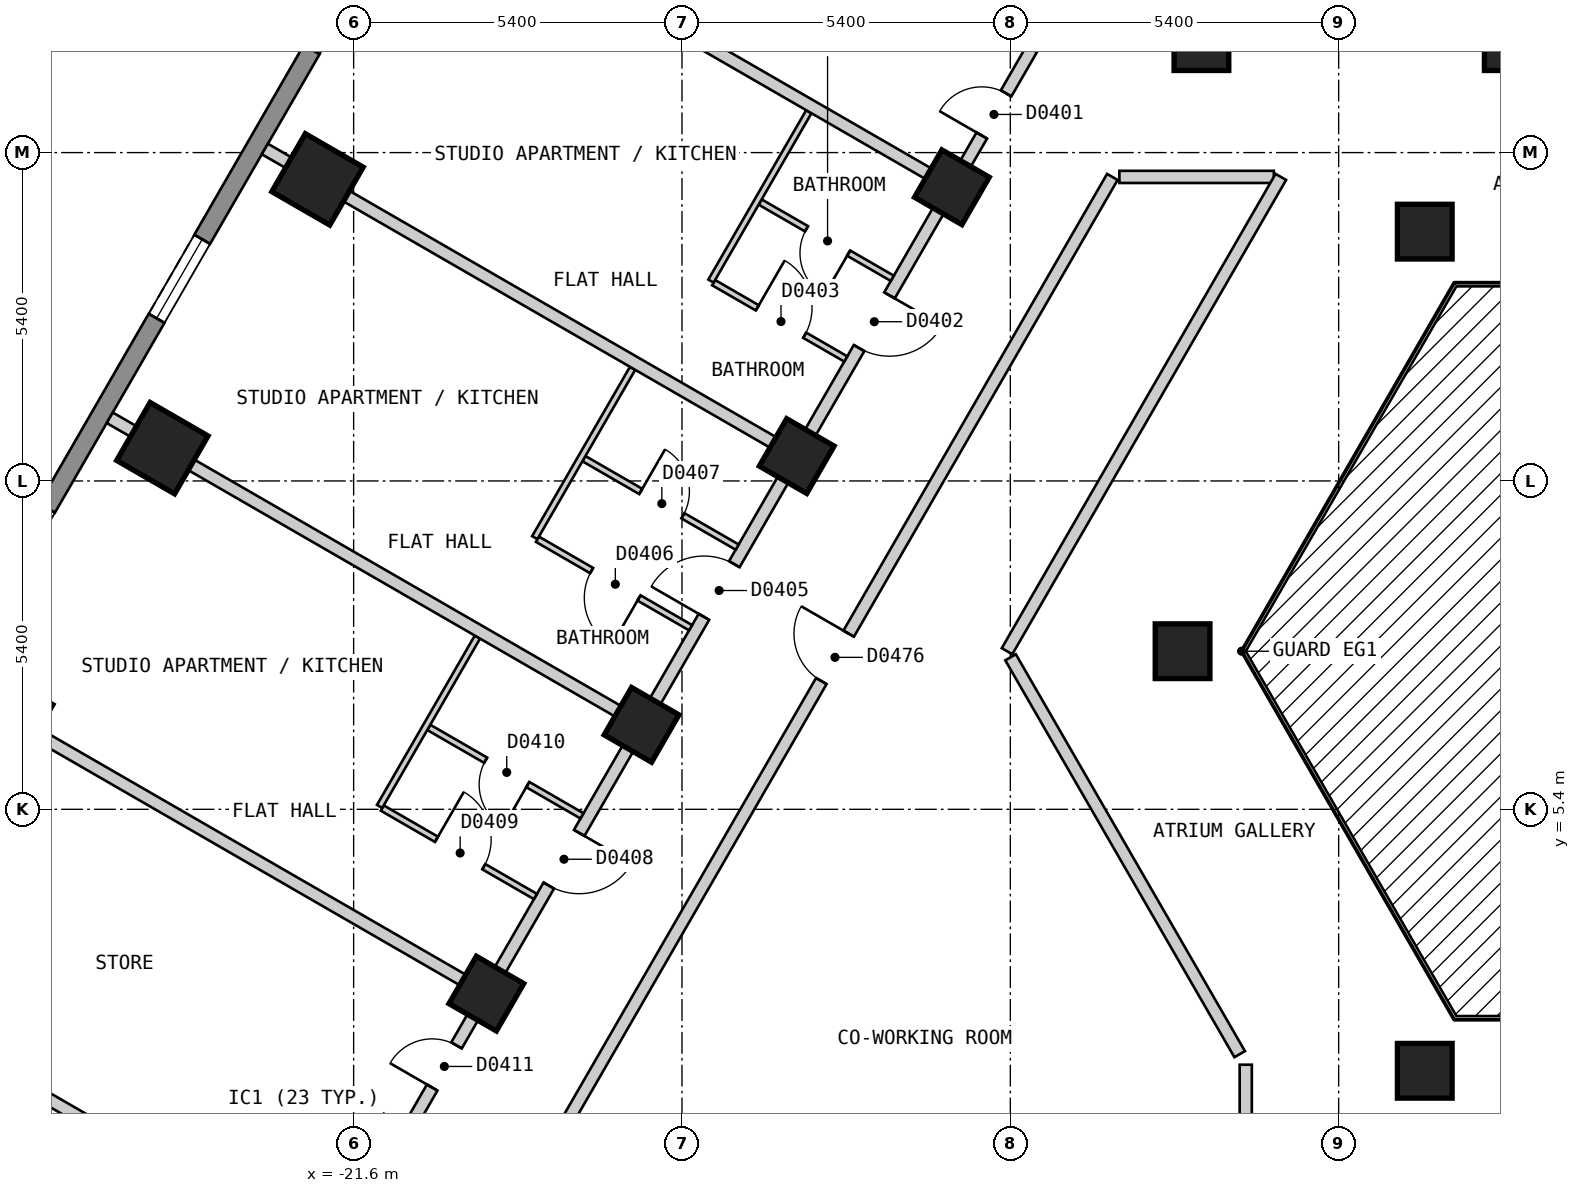
"""IFC4 building model, lengths in metres.
Left out: names, types, materials, properties, quantities, classifications, styles, units other than length and angle.
Written with IfcOpenShell. Run it as: python <this file> out.ifc"""

import sys

from ifc_helpers import new_model, si_unit, direction, frame, frame_2d, origin, origin_2d, place, context, subcontext, project, spatial, polyline, rectangle, outline, extrude, element, fill, save


model = new_model("IFC4")
c1 = context("Model", 3, precision=1e-05, world=origin(), true_north=direction((0.0, 1.0)))
c2 = subcontext(c1, "Body", "Model", "MODEL_VIEW")
j1 = project(units=[si_unit("LENGTHUNIT", "METRE"), si_unit("PLANEANGLEUNIT", "RADIAN")], contexts=[c1])
p1 = place(None, origin())
s1 = spatial("IfcSite", under=j1, at=p1, CompositionType="ELEMENT")
p2 = place(p1, origin())
s2 = spatial("IfcBuilding", under=s1, at=p2, CompositionType="ELEMENT")
p3 = place(p2, frame((0.0, 0.0, 26.4)))
s3 = spatial("IfcBuildingStorey", under=s2, at=p3, CompositionType="ELEMENT", Elevation=26.4)
for number, where, z_axis, x_axis in (
    (1, (-22.194, 15.759, 0.0), (0.0, 0.0, 1.0), (-0.5, -0.866, 0.0)),
    (2, (-24.746, 11.339, 0.0), (0.0, 0.0, 1.0), (-0.5, -0.866, 0.0)),
    (3, (-27.298, 6.919, 0.0), (0.0, 0.0, 1.0), (-0.5, -0.866, 0.0)),
):
    element("IfcColumn", number, at=place(p3, frame(where, z_axis=z_axis, x_axis=x_axis)), inside=s3, PredefinedType="COLUMN", context=c2, shape_type="SweptSolid", body=[
        extrude(rectangle(XDim=1.1, YDim=1.1, at=origin_2d()), origin(), (0.0, 0.0, 1.0), 3.0),
    ])
for number, where, z_axis, x_axis in (
    (4, (-2.553, 18.0, 0.0), (0.0, 0.0, 1.0), (-1.0, 0.0, 0.0)),
    (5, (-3.984, 14.9, 0.0), (0.0, 0.0, 1.0), (1.0, 0.0, 0.0)),
    (6, (-7.657, 18.0, 0.0), (0.0, 0.0, 1.0), (-1.0, 0.0, 0.0)),
    (7, (-11.761, 15.63, 0.0), (0.0, 0.0, 1.0), (-0.5, -0.866, 0.0)),
    (8, (-7.967, 8.0, 0.0), (0.0, 0.0, 1.0), (1.0, 0.0, 0.0)),
    (9, (-14.313, 11.209, 0.0), (0.0, 0.0, 1.0), (-0.5, -0.866, 0.0)),
    (10, (-16.865, 6.789, 0.0), (0.0, 0.0, 1.0), (-0.5, -0.866, 0.0)),
    (11, (-3.984, 1.1, 0.0), (0.0, 0.0, 1.0), (1.0, 0.0, 0.0)),
    (12, (-19.417, 2.369, 0.0), (0.0, 0.0, 1.0), (-0.5, -0.866, 0.0)),
):
    element("IfcColumn", number, at=place(p3, frame(where, z_axis=z_axis, x_axis=x_axis)), inside=s3, PredefinedType="COLUMN", context=c2, shape_type="SweptSolid", body=[
        extrude(rectangle(XDim=0.9, YDim=0.9, at=origin_2d()), origin(), (0.0, 0.0, 1.0), 3.0),
    ])
p4 = place(p3, frame((-17.71, 25.825, 0.0), z_axis=(0.0, 0.0, 1.0), x_axis=(-0.500001938803, -0.866024284413, 0.0)))
e13 = element("IfcWall", 13, at=p4, inside=s3, PredefinedType="SOLIDWALL", context=c2, shape_type="SweptSolid", body=[
    extrude(outline(polyline([(0.0, -0.15), (27.02, -0.15), (26.94, 0.15), (0.08, 0.15), (0.0, -0.15)])), origin(), (0.0, 0.0, 1.0), 2.7),
])
p5 = place(p4, frame((2.553, 0.0, 0.15)))
e14 = element("IfcOpeningElement", 14, at=p5, cuts=e13, PredefinedType="OPENING", context=c2, shape_type="SweptSolid", body=[
    extrude(rectangle(XDim=1.5, YDim=2.1, at=frame_2d((0.75, 1.05))), frame((0.0, 0.16, 0.0), z_axis=(0.0, -1.0, 0.0), x_axis=(1.0, 0.0, 0.0)), (0.0, 0.0, 1.0), 0.32),
])
p6 = place(p4, frame((7.658, 0.0, 0.15)))
e15 = element("IfcOpeningElement", 15, at=p6, cuts=e13, PredefinedType="OPENING", context=c2, shape_type="SweptSolid", body=[
    extrude(rectangle(XDim=1.5, YDim=2.1, at=frame_2d((0.75, 1.05))), frame((0.0, 0.16, 0.0), z_axis=(0.0, -1.0, 0.0), x_axis=(1.0, 0.0, 0.0)), (0.0, 0.0, 1.0), 0.32),
])
p7 = place(p4, frame((12.761, 0.0, 0.15)))
e16 = element("IfcOpeningElement", 16, at=p7, cuts=e13, PredefinedType="OPENING", context=c2, shape_type="SweptSolid", body=[
    extrude(rectangle(XDim=1.5, YDim=2.1, at=frame_2d((0.75, 1.05))), frame((0.0, 0.16, 0.0), z_axis=(0.0, -1.0, 0.0), x_axis=(1.0, 0.0, 0.0)), (0.0, 0.0, 1.0), 0.32),
])
p8 = place(p4, frame((17.865, 0.0, 0.15)))
e17 = element("IfcOpeningElement", 17, at=p8, cuts=e13, PredefinedType="OPENING", context=c2, shape_type="SweptSolid", body=[
    extrude(rectangle(XDim=1.5, YDim=2.1, at=frame_2d((0.75, 1.05))), frame((0.0, 0.16, 0.0), z_axis=(0.0, -1.0, 0.0), x_axis=(1.0, 0.0, 0.0)), (0.0, 0.0, 1.0), 0.32),
])
p9 = place(p4, frame((22.969, 0.0, 0.15)))
e18 = element("IfcOpeningElement", 18, at=p9, cuts=e13, PredefinedType="OPENING", context=c2, shape_type="SweptSolid", body=[
    extrude(rectangle(XDim=1.5, YDim=2.1, at=frame_2d((0.75, 1.05))), frame((0.0, 0.16, 0.0), z_axis=(0.0, -1.0, 0.0), x_axis=(1.0, 0.0, 0.0)), (0.0, 0.0, 1.0), 0.32),
])
p10 = place(p3, frame((-10.796, 7.9, 0.0), z_axis=(0.0, 0.0, 1.0), x_axis=(0.499954271211, -0.866051803703, 0.0)))
e19 = element("IfcWall", 19, at=p10, inside=s3, PredefinedType="PARTITIONING", context=c2, shape_type="SweptSolid", body=[
    extrude(rectangle(XDim=7.536, YDim=0.2, at=frame_2d((3.768, 0.0))), origin(), (0.0, 0.0, 1.0), 2.7),
])
p11 = place(p3, frame((-9.006, 15.8, 0.0), z_axis=(0.0, 0.0, 1.0), x_axis=(1.0, 0.0, 0.0)))
e20 = element("IfcWall", 20, at=p11, inside=s3, PredefinedType="PARTITIONING", context=c2, shape_type="SweptSolid", body=[
    extrude(rectangle(XDim=2.54, YDim=0.2, at=frame_2d((1.27, 0.0))), origin(), (0.0, 0.0, 1.0), 2.7),
])
p12 = place(p3, frame((-10.854, 8.0, 0.0), z_axis=(0.0, 0.0, 1.0), x_axis=(0.499964141897, 0.86604610548, 0.0)))
e21 = element("IfcWall", 21, at=p12, inside=s3, PredefinedType="PARTITIONING", context=c2, shape_type="SweptSolid", body=[
    extrude(rectangle(XDim=9.007, YDim=0.2, at=frame_2d((4.503, 0.0))), origin(), (0.0, 0.0, 1.0), 2.7),
])
p13 = place(p3, frame((-18.244, -0.001, 0.0), z_axis=(0.0, 0.0, 1.0), x_axis=(0.499962999376, 0.866046765051, 0.0)))
e22 = element("IfcWall", 22, at=p13, inside=s3, PredefinedType="PARTITIONING", context=c2, shape_type="SweptSolid", body=[
    extrude(rectangle(XDim=18.245, YDim=0.2, at=frame_2d((9.123, 0.0))), origin(), (0.0, 0.0, 1.0), 2.7),
])
p14 = place(p13, frame((8.672, 0.0, 0.0)))
e23 = element("IfcOpeningElement", 23, at=p14, cuts=e22, PredefinedType="OPENING", context=c2, shape_type="SweptSolid", body=[
    extrude(rectangle(XDim=0.9, YDim=2.1, at=frame_2d((0.45, 1.05))), frame((0.0, 0.11, 0.0), z_axis=(0.0, -1.0, 0.0), x_axis=(1.0, 0.0, 0.0)), (0.0, 0.0, 1.0), 0.22),
])
p15 = place(p3, frame((-20.727, 0.099, 0.0), z_axis=(0.0, 0.0, 1.0), x_axis=(0.499993204491, 0.866029327138, 0.0)))
e24 = element("IfcWall", 24, at=p15, inside=s3, PredefinedType="PARTITIONING", context=c2, shape_type="SweptSolid", body=[
    extrude(rectangle(XDim=20.554, YDim=0.2, at=frame_2d((10.277, 0.0))), origin(), (0.0, 0.0, 1.0), 2.7),
])
p16 = place(p15, frame((18.916, 0.0, 0.0)))
e25 = element("IfcOpeningElement", 25, at=p16, cuts=e24, PredefinedType="OPENING", context=c2, shape_type="SweptSolid", body=[
    extrude(rectangle(XDim=0.8, YDim=2.1, at=frame_2d((0.4, 1.05))), frame((0.0, 0.11, 0.0), z_axis=(0.0, -1.0, 0.0), x_axis=(1.0, 0.0, 0.0)), (0.0, 0.0, 1.0), 0.22),
])
p17 = place(p15, frame((14.88, 0.0, 0.0)))
e26 = element("IfcOpeningElement", 26, at=p17, cuts=e24, PredefinedType="OPENING", context=c2, shape_type="SweptSolid", body=[
    extrude(rectangle(XDim=1.0, YDim=2.1, at=frame_2d((0.5, 1.05))), frame((0.0, 0.11, 0.0), z_axis=(0.0, -1.0, 0.0), x_axis=(1.0, 0.0, 0.0)), (0.0, 0.0, 1.0), 0.22),
])
p18 = place(p15, frame((9.776, 0.0, 0.0)))
e27 = element("IfcOpeningElement", 27, at=p18, cuts=e24, PredefinedType="OPENING", context=c2, shape_type="SweptSolid", body=[
    extrude(rectangle(XDim=1.0, YDim=2.1, at=frame_2d((0.5, 1.05))), frame((0.0, 0.11, 0.0), z_axis=(0.0, -1.0, 0.0), x_axis=(1.0, 0.0, 0.0)), (0.0, 0.0, 1.0), 0.22),
])
p19 = place(p15, frame((4.673, 0.0, 0.0)))
e28 = element("IfcOpeningElement", 28, at=p19, cuts=e24, PredefinedType="OPENING", context=c2, shape_type="SweptSolid", body=[
    extrude(rectangle(XDim=1.0, YDim=2.1, at=frame_2d((0.5, 1.05))), frame((0.0, 0.11, 0.0), z_axis=(0.0, -1.0, 0.0), x_axis=(1.0, 0.0, 0.0)), (0.0, 0.0, 1.0), 0.22),
])
p20 = place(p15, frame((0.838, 0.0, 0.0)))
e29 = element("IfcOpeningElement", 29, at=p20, cuts=e24, PredefinedType="OPENING", context=c2, shape_type="SweptSolid", body=[
    extrude(rectangle(XDim=0.8, YDim=2.1, at=frame_2d((0.4, 1.05))), frame((0.0, 0.11, 0.0), z_axis=(0.0, -1.0, 0.0), x_axis=(1.0, 0.0, 0.0)), (0.0, 0.0, 1.0), 0.22),
])
p21 = place(p3, frame((-6.928, -2.8, 0.0), z_axis=(0.0, 0.0, 1.0), x_axis=(0.0, 1.0, 0.0)))
e30 = element("IfcWall", 30, at=p21, inside=s3, PredefinedType="PARTITIONING", context=c2, shape_type="SweptSolid", body=[
    extrude(rectangle(XDim=4.0, YDim=0.2, at=frame_2d((2.0, 0.0))), origin(), (0.0, 0.0, 1.0), 2.7),
])
p22 = place(p3, frame((-20.364, 6.747, 0.0), z_axis=(0.0, 0.0, 1.0), x_axis=(0.866003949776, -0.500037157592, 0.0)))
e31 = element("IfcWall", 31, at=p22, inside=s3, PredefinedType="PARTITIONING", context=c2, shape_type="SweptSolid", body=[
    extrude(rectangle(XDim=2.91, YDim=0.1, at=frame_2d((1.455, 0.0))), origin(), (0.0, 0.0, 1.0), 2.7),
])
p23 = place(p22, frame((1.08, 0.0, 0.0)))
e32 = element("IfcOpeningElement", 32, at=p23, cuts=e31, PredefinedType="OPENING", context=c2, shape_type="SweptSolid", body=[
    extrude(rectangle(XDim=0.8, YDim=2.1, at=frame_2d((0.4, 1.05))), frame((0.0, 0.06, 0.0), z_axis=(0.0, -1.0, 0.0), x_axis=(1.0, 0.0, 0.0)), (0.0, 0.0, 1.0), 0.12),
])
p24 = place(p3, frame((-21.129, 5.421, 0.0), z_axis=(0.0, 0.0, 1.0), x_axis=(0.865935355752, -0.500155935342, 0.0)))
e33 = element("IfcWall", 33, at=p24, inside=s3, PredefinedType="PARTITIONING", context=c2, shape_type="SweptSolid", body=[
    extrude(rectangle(XDim=2.909, YDim=0.1, at=frame_2d((1.454, 0.0))), origin(), (0.0, 0.0, 1.0), 2.7),
])
p25 = place(p24, frame((1.029, 0.0, 0.0)))
e34 = element("IfcOpeningElement", 34, at=p25, cuts=e33, PredefinedType="OPENING", context=c2, shape_type="SweptSolid", body=[
    extrude(rectangle(XDim=0.9, YDim=2.1, at=frame_2d((0.45, 1.05))), frame((0.0, 0.06, 0.0), z_axis=(0.0, -1.0, 0.0), x_axis=(1.0, 0.0, 0.0)), (0.0, 0.0, 1.0), 0.12),
])
p26 = place(p3, frame((-18.577, 9.841, 0.0), z_axis=(0.0, 0.0, 1.0), x_axis=(0.865899003441, -0.500218867937, 0.0)))
e35 = element("IfcWall", 35, at=p26, inside=s3, PredefinedType="PARTITIONING", context=c2, shape_type="SweptSolid", body=[
    extrude(rectangle(XDim=2.909, YDim=0.1, at=frame_2d((1.455, 0.0))), origin(), (0.0, 0.0, 1.0), 2.7),
])
p27 = place(p26, frame((1.029, 0.0, 0.0)))
e36 = element("IfcOpeningElement", 36, at=p27, cuts=e35, PredefinedType="OPENING", context=c2, shape_type="SweptSolid", body=[
    extrude(rectangle(XDim=0.9, YDim=2.1, at=frame_2d((0.45, 1.05))), frame((0.0, 0.06, 0.0), z_axis=(0.0, -1.0, 0.0), x_axis=(1.0, 0.0, 0.0)), (0.0, 0.0, 1.0), 0.12),
])
p28 = place(p3, frame((-15.679, 14.061, 0.0), z_axis=(0.0, 0.0, 1.0), x_axis=(0.865916579361, -0.500188442078, 0.0)))
e37 = element("IfcWall", 37, at=p28, inside=s3, PredefinedType="PARTITIONING", context=c2, shape_type="SweptSolid", body=[
    extrude(rectangle(XDim=2.509, YDim=0.1, at=frame_2d((1.255, 0.0))), origin(), (0.0, 0.0, 1.0), 2.7),
])
p29 = place(p28, frame((0.829, 0.0, 0.0)))
e38 = element("IfcOpeningElement", 38, at=p29, cuts=e37, PredefinedType="OPENING", context=c2, shape_type="SweptSolid", body=[
    extrude(rectangle(XDim=0.9, YDim=2.1, at=frame_2d((0.45, 1.05))), frame((0.0, 0.06, 0.0), z_axis=(0.0, -1.0, 0.0), x_axis=(1.0, 0.0, 0.0)), (0.0, 0.0, 1.0), 0.12),
])
p30 = place(p3, frame((-14.914, 15.387, 0.0), z_axis=(0.0, 0.0, 1.0), x_axis=(0.865983051302, -0.500073349477, 0.0)))
e39 = element("IfcWall", 39, at=p30, inside=s3, PredefinedType="PARTITIONING", context=c2, shape_type="SweptSolid", body=[
    extrude(rectangle(XDim=2.509, YDim=0.1, at=frame_2d((1.255, 0.0))), origin(), (0.0, 0.0, 1.0), 2.7),
])
p31 = place(p30, frame((0.88, 0.0, 0.0)))
e40 = element("IfcOpeningElement", 40, at=p31, cuts=e39, PredefinedType="OPENING", context=c2, shape_type="SweptSolid", body=[
    extrude(rectangle(XDim=0.8, YDim=2.1, at=frame_2d((0.4, 1.05))), frame((0.0, 0.06, 0.0), z_axis=(0.0, -1.0, 0.0), x_axis=(1.0, 0.0, 0.0)), (0.0, 0.0, 1.0), 0.12),
])
p32 = place(p3, frame((-17.813, 11.167, 0.0), z_axis=(0.0, 0.0, 1.0), x_axis=(0.866087824531, -0.499891868507, 0.0)))
e41 = element("IfcWall", 41, at=p32, inside=s3, PredefinedType="PARTITIONING", context=c2, shape_type="SweptSolid", body=[
    extrude(rectangle(XDim=2.911, YDim=0.1, at=frame_2d((1.456, 0.0))), origin(), (0.0, 0.0, 1.0), 2.7),
])
p33 = place(p32, frame((1.08, 0.0, 0.0)))
e42 = element("IfcOpeningElement", 42, at=p33, cuts=e41, PredefinedType="OPENING", context=c2, shape_type="SweptSolid", body=[
    extrude(rectangle(XDim=0.8, YDim=2.1, at=frame_2d((0.4, 1.05))), frame((0.0, 0.06, 0.0), z_axis=(0.0, -1.0, 0.0), x_axis=(1.0, 0.0, 0.0)), (0.0, 0.0, 1.0), 0.12),
])
p34 = place(p3, frame((-15.723, 14.087, 0.0), z_axis=(0.0, 0.0, 1.0), x_axis=(0.500204249835, 0.865907447969, 0.0)))
e43 = element("IfcWall", 43, at=p34, inside=s3, PredefinedType="PARTITIONING", context=c2, shape_type="SweptSolid", body=[
    extrude(rectangle(XDim=3.217, YDim=0.1, at=frame_2d((1.608, 0.0))), origin(), (0.0, 0.0, 1.0), 2.7),
])
p35 = place(p3, frame((-21.173, 5.447, 0.0), z_axis=(0.0, 0.0, 1.0), x_axis=(0.500162542782, 0.865931539325, 0.0)))
e44 = element("IfcWall", 44, at=p35, inside=s3, PredefinedType="PARTITIONING", context=c2, shape_type="SweptSolid", body=[
    extrude(rectangle(XDim=3.217, YDim=0.1, at=frame_2d((1.609, 0.0))), origin(), (0.0, 0.0, 1.0), 2.7),
])
p36 = place(p3, frame((-18.621, 9.867, 0.0), z_axis=(0.0, 0.0, 1.0), x_axis=(0.500197891286, 0.865911121047, 0.0)))
e45 = element("IfcWall", 45, at=p36, inside=s3, PredefinedType="PARTITIONING", context=c2, shape_type="SweptSolid", body=[
    extrude(rectangle(XDim=3.215, YDim=0.1, at=frame_2d((1.607, 0.0))), origin(), (0.0, 0.0, 1.0), 2.7),
])
p37 = place(p3, frame((-28.163, 7.419, 0.0), z_axis=(0.0, 0.0, 1.0), x_axis=(0.866022959057, -0.500004234368, 0.0)))
e46 = element("IfcWall", 46, at=p37, inside=s3, PredefinedType="PARTITIONING", context=c2, shape_type="SweptSolid", body=[
    extrude(rectangle(XDim=10.0, YDim=0.2, at=frame_2d((5.0, 0.0))), origin(), (0.0, 0.0, 1.0), 2.7),
])
p38 = place(p3, frame((-30.716, 2.999, 0.0), z_axis=(0.0, 0.0, 1.0), x_axis=(0.866032775405, -0.499987231761, 0.0)))
e47 = element("IfcWall", 47, at=p38, inside=s3, PredefinedType="PARTITIONING", context=c2, shape_type="SweptSolid", body=[
    extrude(rectangle(XDim=5.8, YDim=0.2, at=frame_2d((2.9, 0.0))), origin(), (0.0, 0.0, 1.0), 2.7),
])
p39 = place(p3, frame((-25.611, 11.839, 0.0), z_axis=(0.0, 0.0, 1.0), x_axis=(0.866022959057, -0.500004234368, 0.0)))
e48 = element("IfcWall", 48, at=p39, inside=s3, PredefinedType="PARTITIONING", context=c2, shape_type="SweptSolid", body=[
    extrude(rectangle(XDim=10.0, YDim=0.2, at=frame_2d((5.0, 0.0))), origin(), (0.0, 0.0, 1.0), 2.7),
])
for number, where, z_axis, x_axis in (
    (49, (-20.508, 20.679, 0.0), (0.0, 0.0, 1.0), (0.866, -0.5, 0.0)),
    (50, (-23.06, 16.259, 0.0), (0.0, 0.0, 1.0), (0.866, -0.5, 0.0)),
):
    element("IfcWall", number, at=place(p3, frame(where, z_axis=z_axis, x_axis=x_axis)), inside=s3, PredefinedType="PARTITIONING", context=c2, shape_type="SweptSolid", body=[
        extrude(rectangle(XDim=10.001, YDim=0.2, at=frame_2d((5.0, 0.0))), origin(), (0.0, 0.0, 1.0), 2.7),
    ])
p40 = place(p7, origin())
e51 = element("IfcWindow", 51, at=p40, inside=s3, PartitioningType="SINGLE_PANEL", PredefinedType="WINDOW", context=c2, shape_type="SweptSolid", body=[
    extrude(rectangle(XDim=1.5, YDim=2.1, at=frame_2d((0.75, 1.05))), frame((0.0, 0.03, 0.0), z_axis=(0.0, -1.0, 0.0), x_axis=(1.0, 0.0, 0.0)), (0.0, 0.0, 1.0), 0.06),
])
fill(e16, e51)
p41 = place(p16, origin())
e52 = element("IfcDoor", 52, at=p41, inside=s3, OperationType="SINGLE_SWING_LEFT", PredefinedType="DOOR", context=c2, shape_type="SweptSolid", body=[
    extrude(rectangle(XDim=0.8, YDim=2.1, at=frame_2d((0.4, 1.05))), frame((0.0, 0.025, 0.0), z_axis=(0.0, -1.0, 0.0), x_axis=(1.0, 0.0, 0.0)), (0.0, 0.0, 1.0), 0.05),
])
fill(e25, e52)
p42 = place(p17, origin())
e53 = element("IfcDoor", 53, at=p42, inside=s3, OperationType="SINGLE_SWING_RIGHT", PredefinedType="DOOR", context=c2, shape_type="SweptSolid", body=[
    extrude(rectangle(XDim=1.0, YDim=2.1, at=frame_2d((0.5, 1.05))), frame((0.0, 0.025, 0.0), z_axis=(0.0, -1.0, 0.0), x_axis=(1.0, 0.0, 0.0)), (0.0, 0.0, 1.0), 0.05),
])
fill(e26, e53)
p43 = place(p29, origin())
e54 = element("IfcDoor", 54, at=p43, inside=s3, OperationType="SINGLE_SWING_LEFT", PredefinedType="DOOR", context=c2, shape_type="SweptSolid", body=[
    extrude(rectangle(XDim=0.9, YDim=2.1, at=frame_2d((0.45, 1.05))), frame((0.0, 0.025, 0.0), z_axis=(0.0, -1.0, 0.0), x_axis=(1.0, 0.0, 0.0)), (0.0, 0.0, 1.0), 0.05),
])
fill(e38, e54)
p44 = place(p31, origin())
e55 = element("IfcDoor", 55, at=p44, inside=s3, OperationType="SINGLE_SWING_RIGHT", PredefinedType="DOOR", context=c2, shape_type="SweptSolid", body=[
    extrude(rectangle(XDim=0.8, YDim=2.1, at=frame_2d((0.4, 1.05))), frame((0.0, 0.025, 0.0), z_axis=(0.0, -1.0, 0.0), x_axis=(1.0, 0.0, 0.0)), (0.0, 0.0, 1.0), 0.05),
])
fill(e40, e55)
p45 = place(p18, origin())
e56 = element("IfcDoor", 56, at=p45, inside=s3, OperationType="SINGLE_SWING_LEFT", PredefinedType="DOOR", context=c2, shape_type="SweptSolid", body=[
    extrude(rectangle(XDim=1.0, YDim=2.1, at=frame_2d((0.5, 1.05))), frame((0.0, 0.025, 0.0), z_axis=(0.0, -1.0, 0.0), x_axis=(1.0, 0.0, 0.0)), (0.0, 0.0, 1.0), 0.05),
])
fill(e27, e56)
p46 = place(p27, origin())
e57 = element("IfcDoor", 57, at=p46, inside=s3, OperationType="SINGLE_SWING_RIGHT", PredefinedType="DOOR", context=c2, shape_type="SweptSolid", body=[
    extrude(rectangle(XDim=0.9, YDim=2.1, at=frame_2d((0.45, 1.05))), frame((0.0, 0.025, 0.0), z_axis=(0.0, -1.0, 0.0), x_axis=(1.0, 0.0, 0.0)), (0.0, 0.0, 1.0), 0.05),
])
fill(e36, e57)
p47 = place(p33, origin())
e58 = element("IfcDoor", 58, at=p47, inside=s3, OperationType="SINGLE_SWING_LEFT", PredefinedType="DOOR", context=c2, shape_type="SweptSolid", body=[
    extrude(rectangle(XDim=0.8, YDim=2.1, at=frame_2d((0.4, 1.05))), frame((0.0, 0.025, 0.0), z_axis=(0.0, -1.0, 0.0), x_axis=(1.0, 0.0, 0.0)), (0.0, 0.0, 1.0), 0.05),
])
fill(e42, e58)
p48 = place(p19, origin())
e59 = element("IfcDoor", 59, at=p48, inside=s3, OperationType="SINGLE_SWING_RIGHT", PredefinedType="DOOR", context=c2, shape_type="SweptSolid", body=[
    extrude(rectangle(XDim=1.0, YDim=2.1, at=frame_2d((0.5, 1.05))), frame((0.0, 0.025, 0.0), z_axis=(0.0, -1.0, 0.0), x_axis=(1.0, 0.0, 0.0)), (0.0, 0.0, 1.0), 0.05),
])
fill(e28, e59)
p49 = place(p25, origin())
e60 = element("IfcDoor", 60, at=p49, inside=s3, OperationType="SINGLE_SWING_LEFT", PredefinedType="DOOR", context=c2, shape_type="SweptSolid", body=[
    extrude(rectangle(XDim=0.9, YDim=2.1, at=frame_2d((0.45, 1.05))), frame((0.0, 0.025, 0.0), z_axis=(0.0, -1.0, 0.0), x_axis=(1.0, 0.0, 0.0)), (0.0, 0.0, 1.0), 0.05),
])
fill(e34, e60)
p50 = place(p23, origin())
e61 = element("IfcDoor", 61, at=p50, inside=s3, OperationType="SINGLE_SWING_RIGHT", PredefinedType="DOOR", context=c2, shape_type="SweptSolid", body=[
    extrude(rectangle(XDim=0.8, YDim=2.1, at=frame_2d((0.4, 1.05))), frame((0.0, 0.025, 0.0), z_axis=(0.0, -1.0, 0.0), x_axis=(1.0, 0.0, 0.0)), (0.0, 0.0, 1.0), 0.05),
])
fill(e32, e61)
p51 = place(p20, origin())
e62 = element("IfcDoor", 62, at=p51, inside=s3, OperationType="SINGLE_SWING_LEFT", PredefinedType="DOOR", context=c2, shape_type="SweptSolid", body=[
    extrude(rectangle(XDim=0.8, YDim=2.1, at=frame_2d((0.4, 1.05))), frame((0.0, 0.025, 0.0), z_axis=(0.0, -1.0, 0.0), x_axis=(1.0, 0.0, 0.0)), (0.0, 0.0, 1.0), 0.05),
])
fill(e29, e62)
p52 = place(p14, origin())
e63 = element("IfcDoor", 63, at=p52, inside=s3, OperationType="SINGLE_SWING_RIGHT", PredefinedType="DOOR", context=c2, shape_type="SweptSolid", body=[
    extrude(rectangle(XDim=0.9, YDim=2.1, at=frame_2d((0.45, 1.05))), frame((0.0, 0.025, 0.0), z_axis=(0.0, -1.0, 0.0), x_axis=(1.0, 0.0, 0.0)), (0.0, 0.0, 1.0), 0.05),
])
fill(e23, e63)
save(model, sys.argv[1])
